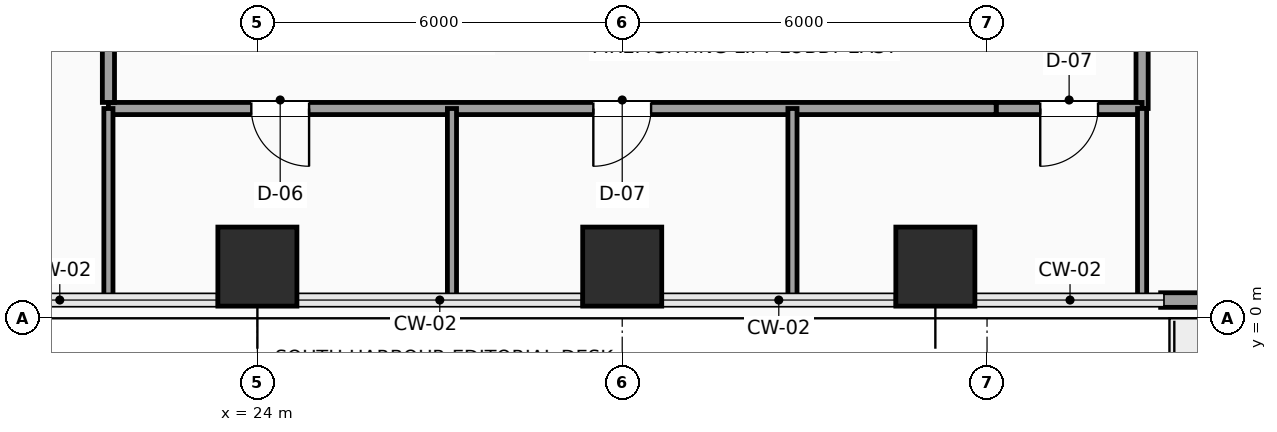
"""IFC4 building model, lengths in metres.
Left out: names, types, materials, properties, quantities, classifications, styles, units other than length and angle.
Written with IfcOpenShell. Run it as: python <this file> out.ifc"""

import sys

from ifc_helpers import new_model, si_unit, direction, frame, frame_2d, origin, origin_2d, place, context, subcontext, project, spatial, rectangle, extrude, element, fill, save


model = new_model("IFC4")
c1 = context("Model", 3, precision=1e-05, world=origin(), true_north=direction((0.0, 1.0)))
c2 = subcontext(c1, "Body", "Model", "MODEL_VIEW")
j1 = project(units=[si_unit("LENGTHUNIT", "METRE"), si_unit("PLANEANGLEUNIT", "RADIAN")], contexts=[c1])
p1 = place(None, origin())
s1 = spatial("IfcSite", under=j1, at=p1, CompositionType="ELEMENT")
p2 = place(p1, origin())
s2 = spatial("IfcBuilding", under=s1, at=p2, CompositionType="ELEMENT")
p3 = place(p2, frame((0.0, 0.0, 59.7)))
s3 = spatial("IfcBuildingStorey", under=s2, at=p3, CompositionType="ELEMENT", Elevation=59.7)
for number, where, z_axis, x_axis in (
    (1, (24.0, 0.85, 0.0), (0.0, 0.0, 1.0), (1.0, 0.0, 0.0)),
    (2, (30.0, 0.85, 0.0), (0.0, 0.0, 1.0), (1.0, 0.0, 0.0)),
    (3, (35.15, 0.85, 0.0), (0.0, 0.0, 1.0), (1.0, 0.0, 0.0)),
):
    element("IfcColumn", number, at=place(p3, frame(where, z_axis=z_axis, x_axis=x_axis)), inside=s3, PredefinedType="COLUMN", context=c2, shape_type="SweptSolid", body=[
        extrude(rectangle(XDim=1.3, YDim=1.3, at=origin_2d()), origin(), (0.0, 0.0, 1.0), 3.9),
    ])
p4 = place(p3, frame((48.145, 0.3, 0.0), z_axis=(0.0, 0.0, 1.0), x_axis=(-1.0, 0.0, 0.0)))
e4 = element("IfcWall", 4, at=p4, inside=s3, PredefinedType="SOLIDWALL", context=c2, shape_type="SweptSolid", body=[
    extrude(rectangle(XDim=9.29, YDim=0.24, at=frame_2d((4.645, 0.0))), origin(), (0.0, 0.0, 1.0), 3.65),
])
p5 = place(p4, frame((3.945, 0.0, 0.0)))
e5 = element("IfcOpeningElement", 5, at=p5, cuts=e4, PredefinedType="OPENING", context=c2, shape_type="SweptSolid", body=[
    extrude(rectangle(XDim=1.05, YDim=2.2, at=frame_2d((0.525, 1.1))), frame((0.0, 0.13, 0.0), z_axis=(0.0, -1.0, 0.0), x_axis=(1.0, 0.0, 0.0)), (0.0, 0.0, 1.0), 0.26),
])
p6 = place(p3, frame((38.55, 5.8, 0.0), z_axis=(0.0, 0.0, 1.0), x_axis=(0.0, -1.0, 0.0)))
e6 = element("IfcWall", 6, at=p6, inside=s3, PredefinedType="SOLIDWALL", context=c2, shape_type="SweptSolid", body=[
    extrude(rectangle(XDim=2.35, YDim=0.2, at=frame_2d((1.175, 0.0))), origin(), (0.0, 0.0, 1.0), 3.65),
])
p7 = place(p3, frame((38.55, 3.45, 0.0), z_axis=(0.0, 0.0, 1.0), x_axis=(-1.0, 0.0, 0.0)))
e7 = element("IfcWall", 7, at=p7, inside=s3, PredefinedType="SOLIDWALL", context=c2, shape_type="SweptSolid", body=[
    extrude(rectangle(XDim=2.4, YDim=0.2, at=frame_2d((1.2, 0.0))), origin(), (0.0, 0.0, 1.0), 3.142),
])
p8 = place(p7, frame((0.725, 0.0, 0.0)))
e8 = element("IfcOpeningElement", 8, at=p8, cuts=e7, PredefinedType="OPENING", context=c2, shape_type="SweptSolid", body=[
    extrude(rectangle(XDim=0.95, YDim=2.15, at=frame_2d((0.475, 1.075))), frame((0.0, 0.11, 0.0), z_axis=(0.0, -1.0, 0.0), x_axis=(1.0, 0.0, 0.0)), (0.0, 0.0, 1.0), 0.22),
])
p9 = place(p3, frame((36.15, 3.45, 0.0), z_axis=(0.0, 0.0, 1.0), x_axis=(-1.0, 0.0, 0.0)))
e9 = element("IfcWall", 9, at=p9, inside=s3, PredefinedType="SOLIDWALL", context=c2, shape_type="SweptSolid", body=[
    extrude(rectangle(XDim=14.6, YDim=0.2, at=frame_2d((7.3, 0.0))), origin(), (0.0, 0.0, 1.0), 3.142),
])
p10 = place(p9, frame((11.3, 0.0, 0.0)))
e10 = element("IfcOpeningElement", 10, at=p10, cuts=e9, PredefinedType="OPENING", context=c2, shape_type="SweptSolid", body=[
    extrude(rectangle(XDim=0.95, YDim=2.15, at=frame_2d((0.475, 1.075))), frame((0.0, 0.11, 0.0), z_axis=(0.0, -1.0, 0.0), x_axis=(1.0, 0.0, 0.0)), (0.0, 0.0, 1.0), 0.22),
])
p11 = place(p9, frame((5.675, 0.0, 0.0)))
e11 = element("IfcOpeningElement", 11, at=p11, cuts=e9, PredefinedType="OPENING", context=c2, shape_type="SweptSolid", body=[
    extrude(rectangle(XDim=0.95, YDim=2.15, at=frame_2d((0.475, 1.075))), frame((0.0, 0.11, 0.0), z_axis=(0.0, -1.0, 0.0), x_axis=(1.0, 0.0, 0.0)), (0.0, 0.0, 1.0), 0.22),
])
p12 = place(p3, frame((21.55, 3.55, 0.0), z_axis=(0.0, 0.0, 1.0), x_axis=(0.0, 1.0, 0.0)))
e12 = element("IfcWall", 12, at=p12, inside=s3, PredefinedType="SOLIDWALL", context=c2, shape_type="SweptSolid", body=[
    extrude(rectangle(XDim=2.25, YDim=0.2, at=frame_2d((1.125, 0.0))), origin(), (0.0, 0.0, 1.0), 3.65),
])
for number, where, z_axis, x_axis in (
    (13, (21.55, 0.3, 0.0), (0.0, 0.0, 1.0), (0.0, 1.0, 0.0)),
    (14, (27.2, 0.3, 0.0), (0.0, 0.0, 1.0), (0.0, 1.0, 0.0)),
    (15, (32.8, 0.3, 0.0), (0.0, 0.0, 1.0), (0.0, 1.0, 0.0)),
    (16, (38.55, 0.3, 0.0), (0.0, 0.0, 1.0), (0.0, 1.0, 0.0)),
):
    element("IfcWall", number, at=place(p3, frame(where, z_axis=z_axis, x_axis=x_axis)), inside=s3, PredefinedType="PARTITIONING", context=c2, shape_type="SweptSolid", body=[
        extrude(rectangle(XDim=3.15, YDim=0.15, at=frame_2d((1.575, 0.0))), origin(), (0.0, 0.0, 1.0), 3.65),
    ])
p13 = place(p8, origin())
e17 = element("IfcDoor", 17, at=p13, inside=s3, OperationType="SINGLE_SWING_RIGHT", PredefinedType="DOOR", context=c2, shape_type="SweptSolid", body=[
    extrude(rectangle(XDim=0.95, YDim=2.15, at=frame_2d((0.475, 1.075))), frame((0.0, 0.025, 0.0), z_axis=(0.0, -1.0, 0.0), x_axis=(1.0, 0.0, 0.0)), (0.0, 0.0, 1.0), 0.05),
])
fill(e8, e17)
p14 = place(p10, origin())
e18 = element("IfcDoor", 18, at=p14, inside=s3, OperationType="SINGLE_SWING_LEFT", PredefinedType="DOOR", context=c2, shape_type="SweptSolid", body=[
    extrude(rectangle(XDim=0.95, YDim=2.15, at=frame_2d((0.475, 1.075))), frame((0.0, 0.025, 0.0), z_axis=(0.0, -1.0, 0.0), x_axis=(1.0, 0.0, 0.0)), (0.0, 0.0, 1.0), 0.05),
])
fill(e10, e18)
p15 = place(p11, origin())
e19 = element("IfcDoor", 19, at=p15, inside=s3, OperationType="SINGLE_SWING_RIGHT", PredefinedType="DOOR", context=c2, shape_type="SweptSolid", body=[
    extrude(rectangle(XDim=0.95, YDim=2.15, at=frame_2d((0.475, 1.075))), frame((0.0, 0.025, 0.0), z_axis=(0.0, -1.0, 0.0), x_axis=(1.0, 0.0, 0.0)), (0.0, 0.0, 1.0), 0.05),
])
fill(e11, e19)
save(model, sys.argv[1])
